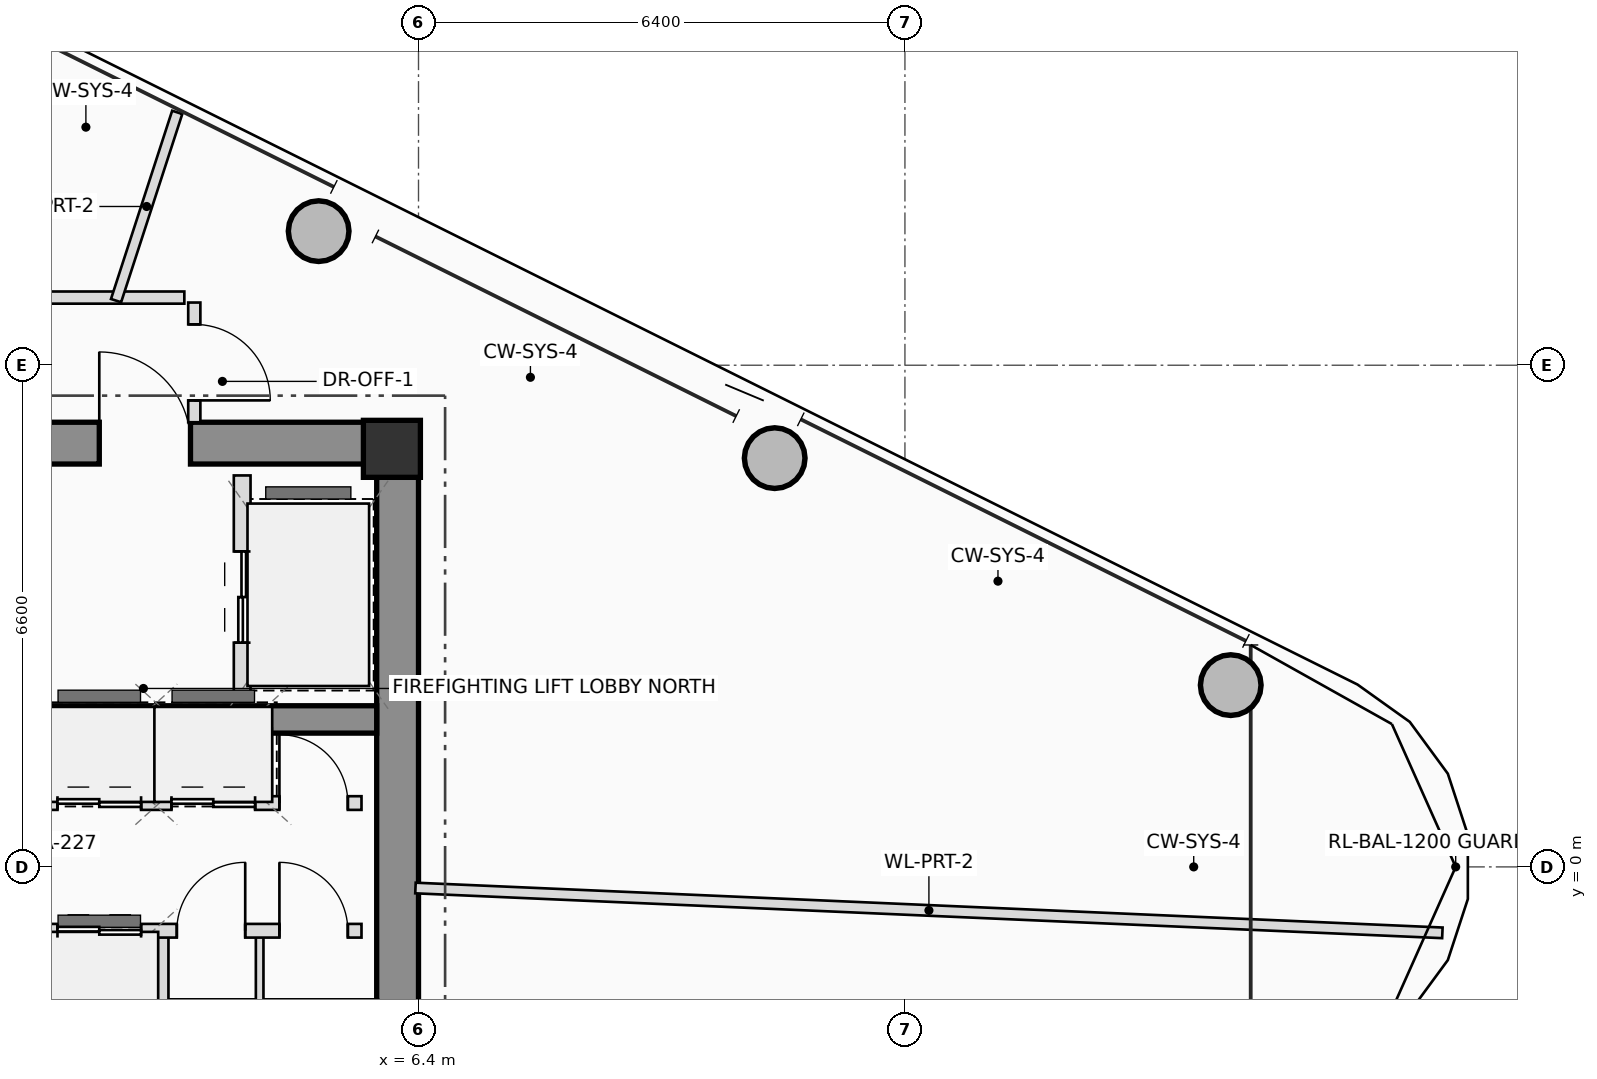
"""IFC4 building model, lengths in metres.
Left out: names, types, materials, properties, quantities, classifications, styles, units other than length and angle.
Written with IfcOpenShell. Run it as: python <this file> out.ifc"""

import sys

from ifc_helpers import new_model, si_unit, direction, frame, frame_2d, origin, origin_2d, place, context, subcontext, project, spatial, rectangle, hollow_circle, extrude, source, transform, mapped, element, fill, save


model = new_model("IFC4")
c1 = context("Model", 3, precision=1e-05, world=origin(), true_north=direction((0.0, 1.0)))
c2 = subcontext(c1, "Body", "Model", "MODEL_VIEW")
j1 = project(units=[si_unit("LENGTHUNIT", "METRE"), si_unit("PLANEANGLEUNIT", "RADIAN")], contexts=[c1])
p1 = place(None, origin())
s1 = spatial("IfcSite", under=j1, at=p1, CompositionType="ELEMENT")
p2 = place(p1, origin())
s2 = spatial("IfcBuilding", under=s1, at=p2, CompositionType="ELEMENT")
p3 = place(p2, frame((0.0, 0.0, 293.3)))
s3 = spatial("IfcBuildingStorey", under=s2, at=p3, CompositionType="ELEMENT", Elevation=293.3)
m1 = source(origin(), c2, "Body", "SweptSolid", [
    extrude(rectangle(XDim=0.75, YDim=0.75, at=origin_2d()), origin(), (0.0, 0.0, 1.0), 3.45),
])
p4 = place(p3, frame((6.05, 5.5, 0.0), z_axis=(0.0, 0.0, 1.0), x_axis=(1.0, 0.0, 0.0)))
e1 = element("IfcColumn", 1, at=p4, inside=s3, PredefinedType="COLUMN", context=c2, shape_type="MappedRepresentation", body=[
    mapped(m1, transform((0.0, 0.0, 0.0), scale=1.0)),
])
p5 = place(p3, frame((-6.4, 5.575, 0.0), z_axis=(0.0, 0.0, 1.0), x_axis=(1.0, 0.0, 0.0)))
e2 = element("IfcWall", 2, at=p5, inside=s3, PredefinedType="SHEAR", context=c2, shape_type="SweptSolid", body=[
    extrude(rectangle(XDim=12.8, YDim=0.55, at=frame_2d((6.4, 0.0))), origin(), (0.0, 0.0, 1.0), 3.45),
])
p6 = place(p5, frame((8.6, 0.0, 0.0)))
e3 = element("IfcOpeningElement", 3, at=p6, cuts=e2, PredefinedType="OPENING", context=c2, shape_type="SweptSolid", body=[
    extrude(rectangle(XDim=1.2, YDim=2.2, at=frame_2d((0.6, 1.1))), frame((0.0, 0.285, 0.0), z_axis=(0.0, -1.0, 0.0), x_axis=(1.0, 0.0, 0.0)), (0.0, 0.0, 1.0), 0.57),
])
p7 = place(p3, frame((6.125, -5.3, 0.0), z_axis=(0.0, 0.0, 1.0), x_axis=(0.0, 1.0, 0.0)))
e4 = element("IfcWall", 4, at=p7, inside=s3, PredefinedType="SHEAR", context=c2, shape_type="SweptSolid", body=[
    extrude(rectangle(XDim=10.6, YDim=0.55, at=frame_2d((5.3, 0.0))), origin(), (0.0, 0.0, 1.0), 3.45),
])
p8 = place(p3, frame((-5.85, 1.94, 0.0), z_axis=(0.0, 0.0, 1.0), x_axis=(1.0, 0.0, 0.0)))
e5 = element("IfcWall", 5, at=p8, inside=s3, PredefinedType="SHEAR", context=c2, shape_type="SweptSolid", body=[
    extrude(rectangle(XDim=11.7, YDim=0.36, at=frame_2d((5.85, 0.0))), origin(), (0.0, 0.0, 1.0), 3.45),
])
m2 = source(origin(), c2, "Body", "SweptSolid", [
    extrude(hollow_circle(Radius=0.4, WallThickness=0.028, at=origin_2d()), origin(), (0.0, 0.0, 1.0), 3.45),
])
for number, where, z_axis, x_axis in (
    (6, (17.087, 2.392, 0.0), (0.0, 0.0, 1.0), (1.0, 0.0, 0.0)),
    (7, (11.086, 5.378, 0.0), (0.0, 0.0, 1.0), (1.0, 0.0, 0.0)),
    (8, (5.086, 8.364, 0.0), (0.0, 0.0, 1.0), (1.0, 0.0, 0.0)),
):
    element("IfcColumn", number, at=place(p3, frame(where, z_axis=z_axis, x_axis=x_axis)), inside=s3, PredefinedType="COLUMN", context=c2, shape_type="MappedRepresentation", body=[
        mapped(m2, transform((0.0, 0.0, 0.0), scale=1.0)),
    ])
p9 = place(p3, frame((4.08, 2.2, 0.0), z_axis=(0.0, 0.0, 1.0), x_axis=(0.0, 1.0, 0.0)))
e9 = element("IfcWall", 9, at=p9, inside=s3, PredefinedType="PLUMBINGWALL", context=c2, shape_type="SweptSolid", body=[
    extrude(rectangle(XDim=2.95, YDim=0.22, at=frame_2d((1.475, 0.0))), origin(), (0.0, 0.0, 1.0), 3.25),
])
p10 = place(p9, frame((0.75, 0.0, 0.0)))
e10 = element("IfcOpeningElement", 10, at=p10, cuts=e9, PredefinedType="OPENING", context=c2, shape_type="SweptSolid", body=[
    extrude(rectangle(XDim=1.2, YDim=2.25, at=frame_2d((0.6, 1.125))), frame((0.0, 0.12, 0.0), z_axis=(0.0, -1.0, 0.0), x_axis=(1.0, 0.0, 0.0)), (0.0, 0.0, 1.0), 0.24),
])
for number, where, z_axis, x_axis in (
    (11, (3.02, 0.84, 0.0), (0.0, 0.0, 1.0), (0.0, 1.0, 0.0)),
    (12, (4.38, 0.84, 0.0), (0.0, 0.0, 1.0), (0.0, 1.0, 0.0)),
    (13, (3.02, -1.82, 0.0), (0.0, 0.0, 1.0), (0.0, 1.0, 0.0)),
):
    element("IfcWall", number, at=place(p3, frame(where, z_axis=z_axis, x_axis=x_axis)), inside=s3, PredefinedType="PLUMBINGWALL", context=c2, shape_type="SweptSolid", body=[
        extrude(rectangle(XDim=0.98, YDim=0.18, at=frame_2d((0.49, 0.0))), origin(), (0.0, 0.0, 1.0), 3.25),
    ])
p11 = place(p3, frame((4.31, -1.82, 0.0), z_axis=(0.0, 0.0, 1.0), x_axis=(0.0, 1.0, 0.0)))
e14 = element("IfcWall", 14, at=p11, inside=s3, PredefinedType="PARTITIONING", context=c2, shape_type="SweptSolid", body=[
    extrude(rectangle(XDim=0.98, YDim=0.1, at=frame_2d((0.49, 0.0))), origin(), (0.0, 0.0, 1.0), 3.25),
])
p12 = place(p3, frame((-5.68, 0.84, 0.0), z_axis=(0.0, 0.0, 1.0), x_axis=(1.0, 0.0, 0.0)))
e15 = element("IfcWall", 15, at=p12, inside=s3, PredefinedType="PLUMBINGWALL", context=c2, shape_type="SweptSolid", body=[
    extrude(rectangle(XDim=11.33, YDim=0.18, at=frame_2d((5.665, 0.0))), origin(), (0.0, 0.0, 1.0), 3.25),
])
p13 = place(p12, frame((1.39, 0.0, 0.0)))
e16 = element("IfcOpeningElement", 16, at=p13, cuts=e15, PredefinedType="OPENING", context=c2, shape_type="SweptSolid", body=[
    extrude(rectangle(XDim=0.92, YDim=2.1, at=frame_2d((0.46, 1.05))), frame((0.0, 0.1, 0.0), z_axis=(0.0, -1.0, 0.0), x_axis=(1.0, 0.0, 0.0)), (0.0, 0.0, 1.0), 0.2),
])
p14 = place(p12, frame((4.87, 0.0, 0.0)))
e17 = element("IfcOpeningElement", 17, at=p14, cuts=e15, PredefinedType="OPENING", context=c2, shape_type="SweptSolid", body=[
    extrude(rectangle(XDim=0.9, YDim=2.05, at=frame_2d((0.45, 1.025))), frame((0.0, 0.1, 0.0), z_axis=(0.0, -1.0, 0.0), x_axis=(1.0, 0.0, 0.0)), (0.0, 0.0, 1.0), 0.2),
])
p15 = place(p12, frame((7.33, 0.0, 0.0)))
e18 = element("IfcOpeningElement", 18, at=p15, cuts=e15, PredefinedType="OPENING", context=c2, shape_type="SweptSolid", body=[
    extrude(rectangle(XDim=1.1, YDim=2.2, at=frame_2d((0.55, 1.1))), frame((0.0, 0.1, 0.0), z_axis=(0.0, -1.0, 0.0), x_axis=(1.0, 0.0, 0.0)), (0.0, 0.0, 1.0), 0.2),
])
p16 = place(p12, frame((8.83, 0.0, 0.0)))
e19 = element("IfcOpeningElement", 19, at=p16, cuts=e15, PredefinedType="OPENING", context=c2, shape_type="SweptSolid", body=[
    extrude(rectangle(XDim=1.1, YDim=2.2, at=frame_2d((0.55, 1.1))), frame((0.0, 0.1, 0.0), z_axis=(0.0, -1.0, 0.0), x_axis=(1.0, 0.0, 0.0)), (0.0, 0.0, 1.0), 0.2),
])
p17 = place(p12, frame((10.25, 0.0, 0.0)))
e20 = element("IfcOpeningElement", 20, at=p17, cuts=e15, PredefinedType="OPENING", context=c2, shape_type="SweptSolid", body=[
    extrude(rectangle(XDim=0.9, YDim=2.05, at=frame_2d((0.45, 1.025))), frame((0.0, 0.1, 0.0), z_axis=(0.0, -1.0, 0.0), x_axis=(1.0, 0.0, 0.0)), (0.0, 0.0, 1.0), 0.2),
])
p18 = place(p3, frame((-5.68, -0.84, 0.0), z_axis=(0.0, 0.0, 1.0), x_axis=(1.0, 0.0, 0.0)))
e21 = element("IfcWall", 21, at=p18, inside=s3, PredefinedType="PLUMBINGWALL", context=c2, shape_type="SweptSolid", body=[
    extrude(rectangle(XDim=11.33, YDim=0.18, at=frame_2d((5.665, 0.0))), origin(), (0.0, 0.0, 1.0), 3.25),
])
p19 = place(p18, frame((1.88, 0.0, 0.0)))
e22 = element("IfcOpeningElement", 22, at=p19, cuts=e21, PredefinedType="OPENING", context=c2, shape_type="SweptSolid", body=[
    extrude(rectangle(XDim=0.9, YDim=2.05, at=frame_2d((0.45, 1.025))), frame((0.0, 0.1, 0.0), z_axis=(0.0, -1.0, 0.0), x_axis=(1.0, 0.0, 0.0)), (0.0, 0.0, 1.0), 0.2),
])
p20 = place(p18, frame((5.35, 0.0, 0.0)))
e23 = element("IfcOpeningElement", 23, at=p20, cuts=e21, PredefinedType="OPENING", context=c2, shape_type="SweptSolid", body=[
    extrude(rectangle(XDim=0.9, YDim=2.05, at=frame_2d((0.45, 1.025))), frame((0.0, 0.1, 0.0), z_axis=(0.0, -1.0, 0.0), x_axis=(1.0, 0.0, 0.0)), (0.0, 0.0, 1.0), 0.2),
])
p21 = place(p18, frame((7.33, 0.0, 0.0)))
e24 = element("IfcOpeningElement", 24, at=p21, cuts=e21, PredefinedType="OPENING", context=c2, shape_type="SweptSolid", body=[
    extrude(rectangle(XDim=1.1, YDim=2.2, at=frame_2d((0.55, 1.1))), frame((0.0, 0.1, 0.0), z_axis=(0.0, -1.0, 0.0), x_axis=(1.0, 0.0, 0.0)), (0.0, 0.0, 1.0), 0.2),
])
p22 = place(p18, frame((8.9, 0.0, 0.0)))
e25 = element("IfcOpeningElement", 25, at=p22, cuts=e21, PredefinedType="OPENING", context=c2, shape_type="SweptSolid", body=[
    extrude(rectangle(XDim=0.9, YDim=2.05, at=frame_2d((0.45, 1.025))), frame((0.0, 0.1, 0.0), z_axis=(0.0, -1.0, 0.0), x_axis=(1.0, 0.0, 0.0)), (0.0, 0.0, 1.0), 0.2),
])
p23 = place(p18, frame((10.25, 0.0, 0.0)))
e26 = element("IfcOpeningElement", 26, at=p23, cuts=e21, PredefinedType="OPENING", context=c2, shape_type="SweptSolid", body=[
    extrude(rectangle(XDim=0.9, YDim=2.05, at=frame_2d((0.45, 1.025))), frame((0.0, 0.1, 0.0), z_axis=(0.0, -1.0, 0.0), x_axis=(1.0, 0.0, 0.0)), (0.0, 0.0, 1.0), 0.2),
])
p24 = place(p3, frame((-6.36, 7.49, 0.0), z_axis=(0.0, 0.0, 1.0), x_axis=(1.0, 0.0, 0.0)))
e27 = element("IfcWall", 27, at=p24, inside=s3, PredefinedType="PARTITIONING", context=c2, shape_type="SweptSolid", body=[
    extrude(rectangle(XDim=9.679, YDim=0.16, at=frame_2d((4.84, 0.0))), origin(), (0.0, 0.0, 1.0), 2.655),
])
p25 = place(p3, frame((3.45, 7.425, 0.0), z_axis=(0.0, 0.0, 1.0), x_axis=(0.0, -1.0, 0.0)))
e28 = element("IfcWall", 28, at=p25, inside=s3, PredefinedType="PARTITIONING", context=c2, shape_type="SweptSolid", body=[
    extrude(rectangle(XDim=1.575, YDim=0.16, at=frame_2d((0.787, 0.0))), origin(), (0.0, 0.0, 1.0), 2.855),
])
p26 = place(p25, frame((0.287, 0.0, 0.0)))
e29 = element("IfcOpeningElement", 29, at=p26, cuts=e28, PredefinedType="OPENING", context=c2, shape_type="SweptSolid", body=[
    extrude(rectangle(XDim=1.0, YDim=2.25, at=frame_2d((0.5, 1.125))), frame((0.0, 0.09, 0.0), z_axis=(0.0, -1.0, 0.0), x_axis=(1.0, 0.0, 0.0)), (0.0, 0.0, 1.0), 0.18),
])
p27 = place(p3, frame((6.36, -0.278, 0.0), z_axis=(0.0, 0.0, 1.0), x_axis=(0.999047623791, -0.043633076864, 0.0)))
e30 = element("IfcWall", 30, at=p27, inside=s3, PredefinedType="PARTITIONING", context=c2, shape_type="SweptSolid", body=[
    extrude(rectangle(XDim=13.524, YDim=0.14, at=frame_2d((6.762, 0.0))), origin(), (0.0, 0.0, 1.0), 2.815),
])
p28 = place(p3, frame((2.421, 7.45, 0.0), z_axis=(0.0, 0.0, 1.0), x_axis=(0.309047920595, 0.951046467201, 0.0)))
e31 = element("IfcWall", 31, at=p28, inside=s3, PredefinedType="PARTITIONING", context=c2, shape_type="SweptSolid", body=[
    extrude(rectangle(XDim=2.604, YDim=0.14, at=frame_2d((1.302, 0.0))), origin(), (0.0, 0.0, 1.0), 2.815),
])
p29 = place(p6, origin())
e32 = element("IfcDoor", 32, at=p29, inside=s3, OperationType="SINGLE_SWING_LEFT", PredefinedType="DOOR", context=c2, shape_type="SweptSolid", body=[
    extrude(rectangle(XDim=1.2, YDim=2.2, at=frame_2d((0.6, 1.1))), frame((0.0, 0.025, 0.0), z_axis=(0.0, -1.0, 0.0), x_axis=(1.0, 0.0, 0.0)), (0.0, 0.0, 1.0), 0.05),
])
fill(e3, e32)
p30 = place(p10, origin())
e33 = element("IfcDoor", 33, at=p30, inside=s3, OperationType="DOUBLE_DOOR_SLIDING", PredefinedType="DOOR", context=c2, shape_type="SweptSolid", body=[
    extrude(rectangle(XDim=1.2, YDim=2.25, at=frame_2d((0.6, 1.125))), frame((0.0, 0.025, 0.0), z_axis=(0.0, -1.0, 0.0), x_axis=(1.0, 0.0, 0.0)), (0.0, 0.0, 1.0), 0.05),
])
fill(e10, e33)
p31 = place(p15, origin())
e34 = element("IfcDoor", 34, at=p31, inside=s3, OperationType="DOUBLE_DOOR_SLIDING", PredefinedType="DOOR", context=c2, shape_type="SweptSolid", body=[
    extrude(rectangle(XDim=1.1, YDim=2.2, at=frame_2d((0.55, 1.1))), frame((0.0, 0.025, 0.0), z_axis=(0.0, -1.0, 0.0), x_axis=(1.0, 0.0, 0.0)), (0.0, 0.0, 1.0), 0.05),
])
fill(e18, e34)
p32 = place(p16, origin())
e35 = element("IfcDoor", 35, at=p32, inside=s3, OperationType="DOUBLE_DOOR_SLIDING", PredefinedType="DOOR", context=c2, shape_type="SweptSolid", body=[
    extrude(rectangle(XDim=1.1, YDim=2.2, at=frame_2d((0.55, 1.1))), frame((0.0, 0.025, 0.0), z_axis=(0.0, -1.0, 0.0), x_axis=(1.0, 0.0, 0.0)), (0.0, 0.0, 1.0), 0.05),
])
fill(e19, e35)
p33 = place(p17, origin())
e36 = element("IfcDoor", 36, at=p33, inside=s3, OperationType="SINGLE_SWING_LEFT", PredefinedType="DOOR", context=c2, shape_type="SweptSolid", body=[
    extrude(rectangle(XDim=0.9, YDim=2.05, at=frame_2d((0.45, 1.025))), frame((0.0, 0.025, 0.0), z_axis=(0.0, -1.0, 0.0), x_axis=(1.0, 0.0, 0.0)), (0.0, 0.0, 1.0), 0.05),
])
fill(e20, e36)
p34 = place(p21, origin())
e37 = element("IfcDoor", 37, at=p34, inside=s3, OperationType="DOUBLE_DOOR_SLIDING", PredefinedType="DOOR", context=c2, shape_type="SweptSolid", body=[
    extrude(rectangle(XDim=1.1, YDim=2.2, at=frame_2d((0.55, 1.1))), frame((0.0, 0.025, 0.0), z_axis=(0.0, -1.0, 0.0), x_axis=(1.0, 0.0, 0.0)), (0.0, 0.0, 1.0), 0.05),
])
fill(e24, e37)
p35 = place(p22, origin())
e38 = element("IfcDoor", 38, at=p35, inside=s3, OperationType="SINGLE_SWING_RIGHT", PredefinedType="DOOR", context=c2, shape_type="SweptSolid", body=[
    extrude(rectangle(XDim=0.9, YDim=2.05, at=frame_2d((0.45, 1.025))), frame((0.0, 0.025, 0.0), z_axis=(0.0, -1.0, 0.0), x_axis=(1.0, 0.0, 0.0)), (0.0, 0.0, 1.0), 0.05),
])
fill(e25, e38)
p36 = place(p23, origin())
e39 = element("IfcDoor", 39, at=p36, inside=s3, OperationType="SINGLE_SWING_LEFT", PredefinedType="DOOR", context=c2, shape_type="SweptSolid", body=[
    extrude(rectangle(XDim=0.9, YDim=2.05, at=frame_2d((0.45, 1.025))), frame((0.0, 0.025, 0.0), z_axis=(0.0, -1.0, 0.0), x_axis=(1.0, 0.0, 0.0)), (0.0, 0.0, 1.0), 0.05),
])
fill(e26, e39)
p37 = place(p26, origin())
e40 = element("IfcDoor", 40, at=p37, inside=s3, OperationType="SINGLE_SWING_RIGHT", PredefinedType="DOOR", context=c2, shape_type="SweptSolid", body=[
    extrude(rectangle(XDim=1.0, YDim=2.25, at=frame_2d((0.5, 1.125))), frame((0.0, 0.025, 0.0), z_axis=(0.0, -1.0, 0.0), x_axis=(1.0, 0.0, 0.0)), (0.0, 0.0, 1.0), 0.05),
])
fill(e29, e40)
save(model, sys.argv[1])
